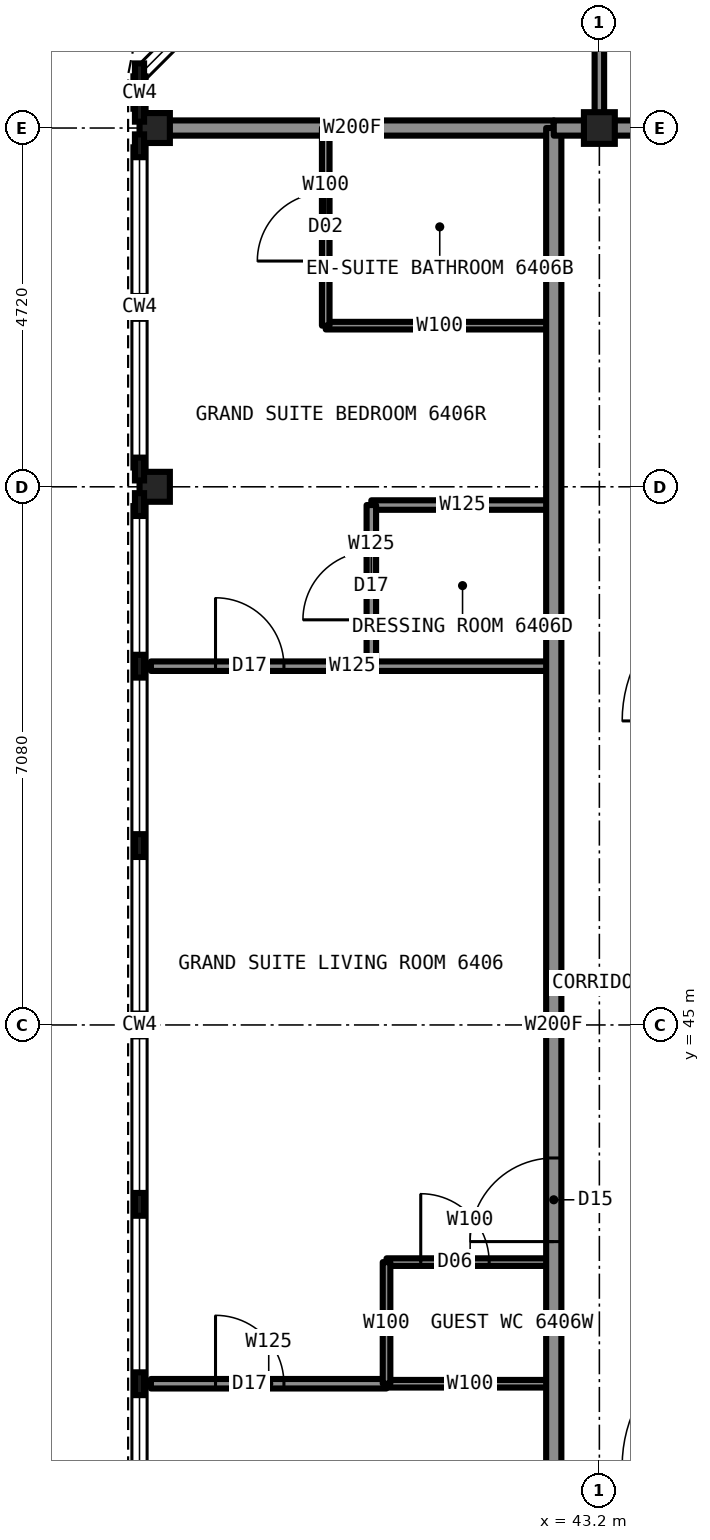
"""IFC4 building model, lengths in metres.
Left out: names, types, materials, properties, quantities, classifications, styles, units other than length and angle.
Written with IfcOpenShell. Run it as: python <this file> out.ifc"""

import sys

from ifc_helpers import new_model, si_unit, direction, frame, frame_2d, origin, origin_2d, place, context, subcontext, project, spatial, rectangle, i_section, extrude, element, fill, save


model = new_model("IFC4")
c1 = context("Model", 3, precision=1e-05, world=origin(), true_north=direction((0.0, 1.0)))
c2 = subcontext(c1, "Body", "Model", "MODEL_VIEW")
j1 = project(units=[si_unit("LENGTHUNIT", "METRE"), si_unit("PLANEANGLEUNIT", "RADIAN")], contexts=[c1])
p1 = place(None, origin())
s1 = spatial("IfcSite", under=j1, at=p1, CompositionType="ELEMENT")
p2 = place(p1, origin())
s2 = spatial("IfcBuilding", under=s1, at=p2, CompositionType="ELEMENT")
p3 = place(p2, frame((0.0, 0.0, 237.2)))
s3 = spatial("IfcBuildingStorey", under=s2, at=p3, CompositionType="ELEMENT", Elevation=237.2)
for number, where, z_axis, x_axis in (
    (1, (37.35, 52.08, 0.0), (0.0, 0.0, 1.0), (1.0, 0.0, 0.0)),
    (2, (37.35, 56.8, 0.0), (0.0, 0.0, 1.0), (1.0, 0.0, 0.0)),
):
    element("IfcColumn", number, at=place(p3, frame(where, z_axis=z_axis, x_axis=x_axis)), inside=s3, PredefinedType="COLUMN", context=c2, shape_type="SweptSolid", body=[
        extrude(i_section(OverallWidth=0.399, OverallDepth=0.394, WebThickness=0.023, FlangeThickness=0.037, at=origin_2d()), origin(), (0.0, 0.0, 1.0), 3.5),
    ])
p4 = place(p3, frame((43.2, 56.8, 0.0), z_axis=(0.0, 0.0, 1.0), x_axis=(1.0, 0.0, 0.0)))
e3 = element("IfcColumn", 3, at=p4, inside=s3, PredefinedType="COLUMN", context=c2, shape_type="SweptSolid", body=[
    extrude(i_section(OverallWidth=0.406, OverallDepth=0.417, WebThickness=0.03, FlangeThickness=0.048, at=origin_2d()), origin(), (0.0, 0.0, 1.0), 3.5),
])
p5 = place(p3, frame((40.4, 41.88, 0.0), z_axis=(0.0, 0.0, 1.0), x_axis=(1.0, 0.0, 0.0)))
e4 = element("IfcWall", 4, at=p5, inside=s3, PredefinedType="PARTITIONING", context=c2, shape_type="SweptSolid", body=[
    extrude(rectangle(XDim=2.2, YDim=0.1, at=frame_2d((1.1, 0.0))), origin(), (0.0, 0.0, 1.0), 3.33),
])
p6 = place(p5, frame((0.45, 0.0, 0.0)))
e5 = element("IfcOpeningElement", 5, at=p6, cuts=e4, PredefinedType="OPENING", context=c2, shape_type="SweptSolid", body=[
    extrude(rectangle(XDim=0.9, YDim=2.1, at=frame_2d((0.45, 1.05))), frame((0.0, 0.06, 0.0), z_axis=(0.0, -1.0, 0.0), x_axis=(1.0, 0.0, 0.0)), (0.0, 0.0, 1.0), 0.12),
])
p7 = place(p3, frame((40.4, 40.28, 0.0), z_axis=(0.0, 0.0, 1.0), x_axis=(1.0, 0.0, 0.0)))
e6 = element("IfcWall", 6, at=p7, inside=s3, PredefinedType="PARTITIONING", context=c2, shape_type="SweptSolid", body=[
    extrude(rectangle(XDim=2.2, YDim=0.1, at=frame_2d((1.1, 0.0))), origin(), (0.0, 0.0, 1.0), 2.797),
])
p8 = place(p3, frame((37.3, 40.28, 0.0), z_axis=(0.0, 0.0, 1.0), x_axis=(1.0, 0.0, 0.0)))
e7 = element("IfcWall", 7, at=p8, inside=s3, PredefinedType="PARTITIONING", context=c2, shape_type="SweptSolid", body=[
    extrude(rectangle(XDim=3.1, YDim=0.125, at=frame_2d((1.55, 0.0))), origin(), (0.0, 0.0, 1.0), 2.797),
])
p9 = place(p8, frame((0.85, 0.0, 0.0)))
e8 = element("IfcOpeningElement", 8, at=p9, cuts=e7, PredefinedType="OPENING", context=c2, shape_type="SweptSolid", body=[
    extrude(rectangle(XDim=0.9, YDim=2.2, at=frame_2d((0.45, 1.1))), frame((0.0, 0.073, 0.0), z_axis=(0.0, -1.0, 0.0), x_axis=(1.0, 0.0, 0.0)), (0.0, 0.0, 1.0), 0.145),
])
p10 = place(p3, frame((43.22, 56.8, 0.0), z_axis=(0.0, 0.0, 1.0), x_axis=(1.0, 0.0, 0.0)))
e9 = element("IfcWall", 9, at=p10, inside=s3, PredefinedType="PARTITIONING", context=c2, shape_type="SweptSolid", body=[
    extrude(rectangle(XDim=1.78, YDim=0.2, at=frame_2d((0.89, 0.0))), origin(), (0.0, 0.0, 1.0), 3.33),
])
p11 = place(p3, frame((37.3, 56.8, 0.0), z_axis=(0.0, 0.0, 1.0), x_axis=(1.0, 0.0, 0.0)))
e10 = element("IfcWall", 10, at=p11, inside=s3, PredefinedType="PARTITIONING", context=c2, shape_type="SweptSolid", body=[
    extrude(rectangle(XDim=5.3, YDim=0.2, at=frame_2d((2.65, 0.0))), origin(), (0.0, 0.0, 1.0), 2.573),
])
p12 = place(p3, frame((37.3, 49.72, 0.0), z_axis=(0.0, 0.0, 1.0), x_axis=(1.0, 0.0, 0.0)))
e11 = element("IfcWall", 11, at=p12, inside=s3, PredefinedType="PARTITIONING", context=c2, shape_type="SweptSolid", body=[
    extrude(rectangle(XDim=5.3, YDim=0.125, at=frame_2d((2.65, 0.0))), origin(), (0.0, 0.0, 1.0), 2.797),
])
p13 = place(p12, frame((0.85, 0.0, 0.0)))
e12 = element("IfcOpeningElement", 12, at=p13, cuts=e11, PredefinedType="OPENING", context=c2, shape_type="SweptSolid", body=[
    extrude(rectangle(XDim=0.9, YDim=2.2, at=frame_2d((0.45, 1.1))), frame((0.0, 0.073, 0.0), z_axis=(0.0, -1.0, 0.0), x_axis=(1.0, 0.0, 0.0)), (0.0, 0.0, 1.0), 0.145),
])
p14 = place(p3, frame((40.2, 51.84, 0.0), z_axis=(0.0, 0.0, 1.0), x_axis=(1.0, 0.0, 0.0)))
e13 = element("IfcWall", 13, at=p14, inside=s3, PredefinedType="PARTITIONING", context=c2, shape_type="SweptSolid", body=[
    extrude(rectangle(XDim=2.4, YDim=0.125, at=frame_2d((1.2, 0.0))), origin(), (0.0, 0.0, 1.0), 3.33),
])
p15 = place(p3, frame((39.6, 54.2, 0.0), z_axis=(0.0, 0.0, 1.0), x_axis=(1.0, 0.0, 0.0)))
e14 = element("IfcWall", 14, at=p15, inside=s3, PredefinedType="PARTITIONING", context=c2, shape_type="SweptSolid", body=[
    extrude(rectangle(XDim=3.0, YDim=0.1, at=frame_2d((1.5, 0.0))), origin(), (0.0, 0.0, 1.0), 3.33),
])
p16 = place(p3, frame((43.2, 56.8, 0.0), z_axis=(0.0, 0.0, 1.0), x_axis=(0.0, 1.0, 0.0)))
e15 = element("IfcWall", 15, at=p16, inside=s3, PredefinedType="PARTITIONING", context=c2, shape_type="SweptSolid", body=[
    extrude(rectangle(XDim=5.9, YDim=0.125, at=frame_2d((2.95, 0.0))), origin(), (0.0, 0.0, 1.0), 2.573),
])
p17 = place(p16, frame((3.55, 0.0, 0.0)))
e16 = element("IfcOpeningElement", 16, at=p17, cuts=e15, PredefinedType="OPENING", context=c2, shape_type="SweptSolid", body=[
    extrude(rectangle(XDim=0.9, YDim=2.2, at=frame_2d((0.45, 1.1))), frame((0.0, 0.073, 0.0), z_axis=(0.0, -1.0, 0.0), x_axis=(1.0, 0.0, 0.0)), (0.0, 0.0, 1.0), 0.145),
])
p18 = place(p3, frame((42.6, 33.2, 0.0), z_axis=(0.0, 0.0, 1.0), x_axis=(0.0, 1.0, 0.0)))
e17 = element("IfcWall", 17, at=p18, inside=s3, PredefinedType="PARTITIONING", context=c2, shape_type="SweptSolid", body=[
    extrude(rectangle(XDim=23.6, YDim=0.2, at=frame_2d((11.8, 0.0))), origin(), (0.0, 0.0, 1.0), 3.33),
])
p19 = place(p18, frame((8.95, 0.0, 0.0)))
e18 = element("IfcOpeningElement", 18, at=p19, cuts=e17, PredefinedType="OPENING", context=c2, shape_type="SweptSolid", body=[
    extrude(rectangle(XDim=1.1, YDim=2.2, at=frame_2d((0.55, 1.1))), frame((0.0, 0.11, 0.0), z_axis=(0.0, -1.0, 0.0), x_axis=(1.0, 0.0, 0.0)), (0.0, 0.0, 1.0), 0.22),
])
p20 = place(p18, frame((0.7, 0.0, 0.0)))
e19 = element("IfcOpeningElement", 19, at=p20, cuts=e17, PredefinedType="OPENING", context=c2, shape_type="SweptSolid", body=[
    extrude(rectangle(XDim=1.0, YDim=2.1, at=frame_2d((0.5, 1.05))), frame((0.0, 0.11, 0.0), z_axis=(0.0, -1.0, 0.0), x_axis=(1.0, 0.0, 0.0)), (0.0, 0.0, 1.0), 0.22),
])
p21 = place(p3, frame((40.4, 40.28, 0.0), z_axis=(0.0, 0.0, 1.0), x_axis=(0.0, 1.0, 0.0)))
e20 = element("IfcWall", 20, at=p21, inside=s3, PredefinedType="PARTITIONING", context=c2, shape_type="SweptSolid", body=[
    extrude(rectangle(XDim=1.6, YDim=0.1, at=frame_2d((0.8, 0.0))), origin(), (0.0, 0.0, 1.0), 3.33),
])
p22 = place(p3, frame((40.2, 49.72, 0.0), z_axis=(0.0, 0.0, 1.0), x_axis=(0.0, 1.0, 0.0)))
e21 = element("IfcWall", 21, at=p22, inside=s3, PredefinedType="PARTITIONING", context=c2, shape_type="SweptSolid", body=[
    extrude(rectangle(XDim=2.12, YDim=0.125, at=frame_2d((1.06, 0.0))), origin(), (0.0, 0.0, 1.0), 3.33),
])
p23 = place(p22, frame((0.61, 0.0, 0.0)))
e22 = element("IfcOpeningElement", 22, at=p23, cuts=e21, PredefinedType="OPENING", context=c2, shape_type="SweptSolid", body=[
    extrude(rectangle(XDim=0.9, YDim=2.2, at=frame_2d((0.45, 1.1))), frame((0.0, 0.073, 0.0), z_axis=(0.0, -1.0, 0.0), x_axis=(1.0, 0.0, 0.0)), (0.0, 0.0, 1.0), 0.145),
])
p24 = place(p3, frame((39.6, 54.2, 0.0), z_axis=(0.0, 0.0, 1.0), x_axis=(0.0, 1.0, 0.0)))
e23 = element("IfcWall", 23, at=p24, inside=s3, PredefinedType="PARTITIONING", context=c2, shape_type="SweptSolid", body=[
    extrude(rectangle(XDim=2.6, YDim=0.1, at=frame_2d((1.3, 0.0))), origin(), (0.0, 0.0, 1.0), 3.33),
])
p25 = place(p24, frame((0.85, 0.0, 0.0)))
e24 = element("IfcOpeningElement", 24, at=p25, cuts=e23, PredefinedType="OPENING", context=c2, shape_type="SweptSolid", body=[
    extrude(rectangle(XDim=0.9, YDim=2.1, at=frame_2d((0.45, 1.05))), frame((0.0, 0.06, 0.0), z_axis=(0.0, -1.0, 0.0), x_axis=(1.0, 0.0, 0.0)), (0.0, 0.0, 1.0), 0.12),
])
p26 = place(p3, frame((42.6, 56.8, 0.0), z_axis=(0.0, 0.0, 1.0), x_axis=(1.0, 0.0, 0.0)))
e25 = element("IfcWall", 25, at=p26, inside=s3, PredefinedType="PARTITIONING", context=c2, shape_type="SweptSolid", body=[
    extrude(rectangle(XDim=0.62, YDim=0.2, at=frame_2d((0.31, 0.0))), origin(), (0.0, 0.0, 1.0), 2.573),
])
p27 = place(p19, origin())
e26 = element("IfcDoor", 26, at=p27, inside=s3, OperationType="SINGLE_SWING_LEFT", PredefinedType="DOOR", context=c2, shape_type="SweptSolid", body=[
    extrude(rectangle(XDim=1.1, YDim=2.2, at=frame_2d((0.55, 1.1))), frame((0.0, 0.025, 0.0), z_axis=(0.0, -1.0, 0.0), x_axis=(1.0, 0.0, 0.0)), (0.0, 0.0, 1.0), 0.05),
])
fill(e18, e26)
p28 = place(p25, origin())
e27 = element("IfcDoor", 27, at=p28, inside=s3, OperationType="SINGLE_SWING_RIGHT", PredefinedType="DOOR", context=c2, shape_type="SweptSolid", body=[
    extrude(rectangle(XDim=0.9, YDim=2.1, at=frame_2d((0.45, 1.05))), frame((0.0, 0.025, 0.0), z_axis=(0.0, -1.0, 0.0), x_axis=(1.0, 0.0, 0.0)), (0.0, 0.0, 1.0), 0.05),
])
fill(e24, e27)
p29 = place(p23, origin())
e28 = element("IfcDoor", 28, at=p29, inside=s3, OperationType="SINGLE_SWING_LEFT", PredefinedType="DOOR", context=c2, shape_type="SweptSolid", body=[
    extrude(rectangle(XDim=0.9, YDim=2.2, at=frame_2d((0.45, 1.1))), frame((0.0, 0.025, 0.0), z_axis=(0.0, -1.0, 0.0), x_axis=(1.0, 0.0, 0.0)), (0.0, 0.0, 1.0), 0.05),
])
fill(e22, e28)
p30 = place(p9, origin())
e29 = element("IfcDoor", 29, at=p30, inside=s3, OperationType="SINGLE_SWING_LEFT", PredefinedType="DOOR", context=c2, shape_type="SweptSolid", body=[
    extrude(rectangle(XDim=0.9, YDim=2.2, at=frame_2d((0.45, 1.1))), frame((0.0, 0.025, 0.0), z_axis=(0.0, -1.0, 0.0), x_axis=(1.0, 0.0, 0.0)), (0.0, 0.0, 1.0), 0.05),
])
fill(e8, e29)
p31 = place(p13, origin())
e30 = element("IfcDoor", 30, at=p31, inside=s3, OperationType="SINGLE_SWING_LEFT", PredefinedType="DOOR", context=c2, shape_type="SweptSolid", body=[
    extrude(rectangle(XDim=0.9, YDim=2.2, at=frame_2d((0.45, 1.1))), frame((0.0, 0.025, 0.0), z_axis=(0.0, -1.0, 0.0), x_axis=(1.0, 0.0, 0.0)), (0.0, 0.0, 1.0), 0.05),
])
fill(e12, e30)
p32 = place(p6, origin())
e31 = element("IfcDoor", 31, at=p32, inside=s3, OperationType="SINGLE_SWING_LEFT", PredefinedType="DOOR", context=c2, shape_type="SweptSolid", body=[
    extrude(rectangle(XDim=0.9, YDim=2.1, at=frame_2d((0.45, 1.05))), frame((0.0, 0.025, 0.0), z_axis=(0.0, -1.0, 0.0), x_axis=(1.0, 0.0, 0.0)), (0.0, 0.0, 1.0), 0.05),
])
fill(e5, e31)
save(model, sys.argv[1])
